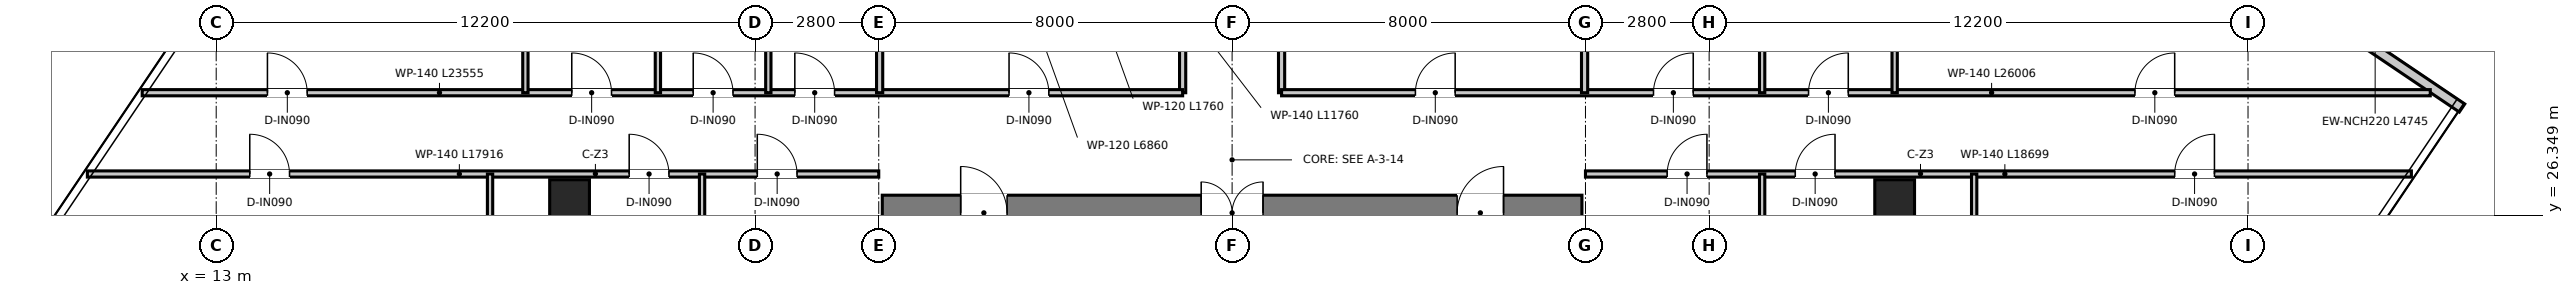
"""IFC4 building model, lengths in metres.
Left out: names, types, materials, properties, quantities, classifications, styles, units other than length and angle.
Written with IfcOpenShell. Run it as: python <this file> out.ifc"""

import sys

from ifc_helpers import new_model, si_unit, direction, frame, frame_2d, origin, origin_2d, place, context, subcontext, project, spatial, rectangle, extrude, source, transform, mapped, element, fill, save


model = new_model("IFC4")
c1 = context("Model", 3, precision=1e-05, world=origin(), true_north=direction((0.0, 1.0)))
c2 = subcontext(c1, "Body", "Model", "MODEL_VIEW")
j1 = project(units=[si_unit("LENGTHUNIT", "METRE"), si_unit("PLANEANGLEUNIT", "RADIAN")], contexts=[c1])
p1 = place(None, origin())
s1 = spatial("IfcSite", under=j1, at=p1, CompositionType="ELEMENT")
p2 = place(p1, origin())
s2 = spatial("IfcBuilding", under=s1, at=p2, CompositionType="ELEMENT")
p3 = place(p2, frame((0.0, 0.0, 185.7)))
s3 = spatial("IfcBuildingStorey", under=s2, at=p3, CompositionType="ELEMENT", Elevation=185.7)
p4 = place(p3, frame((28.08, 26.4, 0.0), z_axis=(0.0, 0.0, 1.0), x_axis=(1.0, 0.0, 0.0)))
e1 = element("IfcWall", 1, at=p4, inside=s3, PredefinedType="SHEAR", context=c2, shape_type="SweptSolid", body=[
    extrude(rectangle(XDim=15.84, YDim=0.8, at=frame_2d((7.92, 0.0))), origin(), (0.0, 0.0, 1.0), 3.95),
])
p5 = place(p4, frame((7.22, 0.0, 0.0)))
e2 = element("IfcOpeningElement", 2, at=p5, cuts=e1, PredefinedType="OPENING", context=c2, shape_type="SweptSolid", body=[
    extrude(rectangle(XDim=1.4, YDim=2.2, at=frame_2d((0.7, 1.1))), frame((0.0, 0.41, 0.0), z_axis=(0.0, -1.0, 0.0), x_axis=(1.0, 0.0, 0.0)), (0.0, 0.0, 1.0), 0.82),
])
p6 = place(p4, frame((1.775, 0.0, 0.0)))
e3 = element("IfcOpeningElement", 3, at=p6, cuts=e1, PredefinedType="OPENING", context=c2, shape_type="SweptSolid", body=[
    extrude(rectangle(XDim=1.05, YDim=2.1, at=frame_2d((0.525, 1.05))), frame((0.0, 0.41, 0.0), z_axis=(0.0, -1.0, 0.0), x_axis=(1.0, 0.0, 0.0)), (0.0, 0.0, 1.0), 0.82),
])
p7 = place(p4, frame((13.015, 0.0, 0.0)))
e4 = element("IfcOpeningElement", 4, at=p7, cuts=e1, PredefinedType="OPENING", context=c2, shape_type="SweptSolid", body=[
    extrude(rectangle(XDim=1.05, YDim=2.1, at=frame_2d((0.525, 1.05))), frame((0.0, 0.41, 0.0), z_axis=(0.0, -1.0, 0.0), x_axis=(1.0, 0.0, 0.0)), (0.0, 0.0, 1.0), 0.82),
])
m1 = source(origin(), c2, "Body", "SweptSolid", [
    extrude(rectangle(XDim=0.9, YDim=0.9, at=origin_2d()), origin(), (0.0, 0.0, 1.0), 3.95),
])
for number, where, z_axis, x_axis in (
    (5, (21.0, 26.7, 0.0), (0.0, 0.0, 1.0), (1.0, 0.0, 0.0)),
    (6, (51.0, 26.7, 0.0), (0.0, 0.0, 1.0), (1.0, 0.0, 0.0)),
):
    element("IfcColumn", number, at=place(p3, frame(where, z_axis=z_axis, x_axis=x_axis)), inside=s3, PredefinedType="COLUMN", context=c2, shape_type="MappedRepresentation", body=[
        mapped(m1, transform((0.0, 0.0, 0.0), x_axis=(1.0, 0.0, 0.0), y_axis=(0.0, 1.0, 0.0), z_axis=(0.0, 0.0, 1.0), scale=1.0)),
    ])
p8 = place(p3, frame((63.845, 28.774, 0.0), z_axis=(0.0, 0.0, 1.0), x_axis=(-0.829006114382, 0.559239539301, 0.0)))
e7 = element("IfcWall", 7, at=p8, inside=s3, PredefinedType="ELEMENTEDWALL", context=c2, shape_type="SweptSolid", body=[
    extrude(rectangle(XDim=4.745, YDim=0.22, at=frame_2d((2.373, 0.0))), origin(), (0.0, 0.0, 1.0), 3.67),
])
p9 = place(p3, frame((34.88, 29.12, 0.0), z_axis=(0.0, 0.0, 1.0), x_axis=(0.0, 1.0, 0.0)))
e8 = element("IfcWall", 8, at=p9, inside=s3, PredefinedType="PARTITIONING", context=c2, shape_type="SweptSolid", body=[
    extrude(rectangle(XDim=11.76, YDim=0.14, at=frame_2d((5.88, 0.0))), origin(), (0.0, 0.0, 1.0), 3.03),
])
p10 = place(p9, frame((4.085, 0.0, 0.0)))
e9 = element("IfcOpeningElement", 9, at=p10, cuts=e8, PredefinedType="OPENING", context=c2, shape_type="SweptSolid", body=[
    extrude(rectangle(XDim=0.95, YDim=2.1, at=frame_2d((0.475, 1.05))), frame((0.0, 0.08, 0.0), z_axis=(0.0, -1.0, 0.0), x_axis=(1.0, 0.0, 0.0)), (0.0, 0.0, 1.0), 0.16),
])
p11 = place(p9, frame((6.82, 0.0, 0.0)))
e10 = element("IfcOpeningElement", 10, at=p11, cuts=e8, PredefinedType="OPENING", context=c2, shape_type="SweptSolid", body=[
    extrude(rectangle(XDim=0.9, YDim=2.1, at=frame_2d((0.45, 1.05))), frame((0.0, 0.08, 0.0), z_axis=(0.0, -1.0, 0.0), x_axis=(1.0, 0.0, 0.0)), (0.0, 0.0, 1.0), 0.16),
])
p12 = place(p9, frame((9.83, 0.0, 0.0)))
e11 = element("IfcOpeningElement", 11, at=p12, cuts=e8, PredefinedType="OPENING", context=c2, shape_type="SweptSolid", body=[
    extrude(rectangle(XDim=0.9, YDim=2.1, at=frame_2d((0.45, 1.05))), frame((0.0, 0.08, 0.0), z_axis=(0.0, -1.0, 0.0), x_axis=(1.0, 0.0, 0.0)), (0.0, 0.0, 1.0), 0.16),
])
p13 = place(p3, frame((37.12, 29.12, 0.0), z_axis=(0.0, 0.0, 1.0), x_axis=(0.0, 1.0, 0.0)))
e12 = element("IfcWall", 12, at=p13, inside=s3, PredefinedType="PARTITIONING", context=c2, shape_type="SweptSolid", body=[
    extrude(rectangle(XDim=11.76, YDim=0.14, at=frame_2d((5.88, 0.0))), origin(), (0.0, 0.0, 1.0), 3.03),
])
p14 = place(p13, frame((3.205, 0.0, 0.0)))
e13 = element("IfcOpeningElement", 13, at=p14, cuts=e12, PredefinedType="OPENING", context=c2, shape_type="SweptSolid", body=[
    extrude(rectangle(XDim=0.95, YDim=2.1, at=frame_2d((0.475, 1.05))), frame((0.0, 0.08, 0.0), z_axis=(0.0, -1.0, 0.0), x_axis=(1.0, 0.0, 0.0)), (0.0, 0.0, 1.0), 0.16),
])
p15 = place(p13, frame((8.02, 0.0, 0.0)))
e14 = element("IfcOpeningElement", 14, at=p15, cuts=e12, PredefinedType="OPENING", context=c2, shape_type="SweptSolid", body=[
    extrude(rectangle(XDim=0.9, YDim=2.1, at=frame_2d((0.45, 1.05))), frame((0.0, 0.08, 0.0), z_axis=(0.0, -1.0, 0.0), x_axis=(1.0, 0.0, 0.0)), (0.0, 0.0, 1.0), 0.16),
])
p16 = place(p3, frame((11.325, 29.12, 0.0), z_axis=(0.0, 0.0, 1.0), x_axis=(1.0, 0.0, 0.0)))
e15 = element("IfcWall", 15, at=p16, inside=s3, PredefinedType="PARTITIONING", context=c2, shape_type="SweptSolid", body=[
    extrude(rectangle(XDim=23.555, YDim=0.14, at=frame_2d((11.778, 0.0))), origin(), (0.0, 0.0, 1.0), 3.03),
])
p17 = place(p16, frame((19.625, 0.0, 0.0)))
e16 = element("IfcOpeningElement", 16, at=p17, cuts=e15, PredefinedType="OPENING", context=c2, shape_type="SweptSolid", body=[
    extrude(rectangle(XDim=0.9, YDim=2.1, at=frame_2d((0.45, 1.05))), frame((0.0, 0.08, 0.0), z_axis=(0.0, -1.0, 0.0), x_axis=(1.0, 0.0, 0.0)), (0.0, 0.0, 1.0), 0.16),
])
p18 = place(p16, frame((2.835, 0.0, 0.0)))
e17 = element("IfcOpeningElement", 17, at=p18, cuts=e15, PredefinedType="OPENING", context=c2, shape_type="SweptSolid", body=[
    extrude(rectangle(XDim=0.9, YDim=2.1, at=frame_2d((0.45, 1.05))), frame((0.0, 0.08, 0.0), z_axis=(0.0, -1.0, 0.0), x_axis=(1.0, 0.0, 0.0)), (0.0, 0.0, 1.0), 0.16),
])
p19 = place(p16, frame((9.725, 0.0, 0.0)))
e18 = element("IfcOpeningElement", 18, at=p19, cuts=e15, PredefinedType="OPENING", context=c2, shape_type="SweptSolid", body=[
    extrude(rectangle(XDim=0.9, YDim=2.1, at=frame_2d((0.45, 1.05))), frame((0.0, 0.08, 0.0), z_axis=(0.0, -1.0, 0.0), x_axis=(1.0, 0.0, 0.0)), (0.0, 0.0, 1.0), 0.16),
])
p20 = place(p16, frame((12.475, 0.0, 0.0)))
e19 = element("IfcOpeningElement", 19, at=p20, cuts=e15, PredefinedType="OPENING", context=c2, shape_type="SweptSolid", body=[
    extrude(rectangle(XDim=0.9, YDim=2.1, at=frame_2d((0.45, 1.05))), frame((0.0, 0.08, 0.0), z_axis=(0.0, -1.0, 0.0), x_axis=(1.0, 0.0, 0.0)), (0.0, 0.0, 1.0), 0.16),
])
p21 = place(p16, frame((14.775, 0.0, 0.0)))
e20 = element("IfcOpeningElement", 20, at=p21, cuts=e15, PredefinedType="OPENING", context=c2, shape_type="SweptSolid", body=[
    extrude(rectangle(XDim=0.9, YDim=2.1, at=frame_2d((0.45, 1.05))), frame((0.0, 0.08, 0.0), z_axis=(0.0, -1.0, 0.0), x_axis=(1.0, 0.0, 0.0)), (0.0, 0.0, 1.0), 0.16),
])
p22 = place(p3, frame((37.12, 29.12, 0.0), z_axis=(0.0, 0.0, 1.0), x_axis=(1.0, 0.0, 0.0)))
e21 = element("IfcWall", 21, at=p22, inside=s3, PredefinedType="PARTITIONING", context=c2, shape_type="SweptSolid", body=[
    extrude(rectangle(XDim=26.006, YDim=0.14, at=frame_2d((13.003, 0.0))), origin(), (0.0, 0.0, 1.0), 3.03),
])
p23 = place(p22, frame((3.03, 0.0, 0.0)))
e22 = element("IfcOpeningElement", 22, at=p23, cuts=e21, PredefinedType="OPENING", context=c2, shape_type="SweptSolid", body=[
    extrude(rectangle(XDim=0.9, YDim=2.1, at=frame_2d((0.45, 1.05))), frame((0.0, 0.08, 0.0), z_axis=(0.0, -1.0, 0.0), x_axis=(1.0, 0.0, 0.0)), (0.0, 0.0, 1.0), 0.16),
])
p24 = place(p22, frame((8.42, 0.0, 0.0)))
e23 = element("IfcOpeningElement", 23, at=p24, cuts=e21, PredefinedType="OPENING", context=c2, shape_type="SweptSolid", body=[
    extrude(rectangle(XDim=0.9, YDim=2.1, at=frame_2d((0.45, 1.05))), frame((0.0, 0.08, 0.0), z_axis=(0.0, -1.0, 0.0), x_axis=(1.0, 0.0, 0.0)), (0.0, 0.0, 1.0), 0.16),
])
p25 = place(p22, frame((11.93, 0.0, 0.0)))
e24 = element("IfcOpeningElement", 24, at=p25, cuts=e21, PredefinedType="OPENING", context=c2, shape_type="SweptSolid", body=[
    extrude(rectangle(XDim=0.9, YDim=2.1, at=frame_2d((0.45, 1.05))), frame((0.0, 0.08, 0.0), z_axis=(0.0, -1.0, 0.0), x_axis=(1.0, 0.0, 0.0)), (0.0, 0.0, 1.0), 0.16),
])
p26 = place(p22, frame((19.32, 0.0, 0.0)))
e25 = element("IfcOpeningElement", 25, at=p26, cuts=e21, PredefinedType="OPENING", context=c2, shape_type="SweptSolid", body=[
    extrude(rectangle(XDim=0.9, YDim=2.1, at=frame_2d((0.45, 1.05))), frame((0.0, 0.08, 0.0), z_axis=(0.0, -1.0, 0.0), x_axis=(1.0, 0.0, 0.0)), (0.0, 0.0, 1.0), 0.16),
])
p27 = place(p3, frame((10.083, 27.28, 0.0), z_axis=(0.0, 0.0, 1.0), x_axis=(1.0, 0.0, 0.0)))
e26 = element("IfcWall", 26, at=p27, inside=s3, PredefinedType="PARTITIONING", context=c2, shape_type="SweptSolid", body=[
    extrude(rectangle(XDim=17.917, YDim=0.14, at=frame_2d((8.958, 0.0))), origin(), (0.0, 0.0, 1.0), 3.03),
])
p28 = place(p27, frame((3.677, 0.0, 0.0)))
e27 = element("IfcOpeningElement", 27, at=p28, cuts=e26, PredefinedType="OPENING", context=c2, shape_type="SweptSolid", body=[
    extrude(rectangle(XDim=0.9, YDim=2.1, at=frame_2d((0.45, 1.05))), frame((0.0, 0.08, 0.0), z_axis=(0.0, -1.0, 0.0), x_axis=(1.0, 0.0, 0.0)), (0.0, 0.0, 1.0), 0.16),
])
p29 = place(p27, frame((12.266, 0.0, 0.0)))
e28 = element("IfcOpeningElement", 28, at=p29, cuts=e26, PredefinedType="OPENING", context=c2, shape_type="SweptSolid", body=[
    extrude(rectangle(XDim=0.9, YDim=2.1, at=frame_2d((0.45, 1.05))), frame((0.0, 0.08, 0.0), z_axis=(0.0, -1.0, 0.0), x_axis=(1.0, 0.0, 0.0)), (0.0, 0.0, 1.0), 0.16),
])
p30 = place(p27, frame((15.167, 0.0, 0.0)))
e29 = element("IfcOpeningElement", 29, at=p30, cuts=e26, PredefinedType="OPENING", context=c2, shape_type="SweptSolid", body=[
    extrude(rectangle(XDim=0.9, YDim=2.1, at=frame_2d((0.45, 1.05))), frame((0.0, 0.08, 0.0), z_axis=(0.0, -1.0, 0.0), x_axis=(1.0, 0.0, 0.0)), (0.0, 0.0, 1.0), 0.16),
])
p31 = place(p3, frame((44.0, 27.28, 0.0), z_axis=(0.0, 0.0, 1.0), x_axis=(1.0, 0.0, 0.0)))
e30 = element("IfcWall", 30, at=p31, inside=s3, PredefinedType="PARTITIONING", context=c2, shape_type="SweptSolid", body=[
    extrude(rectangle(XDim=18.699, YDim=0.14, at=frame_2d((9.349, 0.0))), origin(), (0.0, 0.0, 1.0), 3.03),
])
p32 = place(p31, frame((1.85, 0.0, 0.0)))
e31 = element("IfcOpeningElement", 31, at=p32, cuts=e30, PredefinedType="OPENING", context=c2, shape_type="SweptSolid", body=[
    extrude(rectangle(XDim=0.9, YDim=2.1, at=frame_2d((0.45, 1.05))), frame((0.0, 0.08, 0.0), z_axis=(0.0, -1.0, 0.0), x_axis=(1.0, 0.0, 0.0)), (0.0, 0.0, 1.0), 0.16),
])
p33 = place(p31, frame((4.75, 0.0, 0.0)))
e32 = element("IfcOpeningElement", 32, at=p33, cuts=e30, PredefinedType="OPENING", context=c2, shape_type="SweptSolid", body=[
    extrude(rectangle(XDim=0.9, YDim=2.1, at=frame_2d((0.45, 1.05))), frame((0.0, 0.08, 0.0), z_axis=(0.0, -1.0, 0.0), x_axis=(1.0, 0.0, 0.0)), (0.0, 0.0, 1.0), 0.16),
])
p34 = place(p31, frame((13.34, 0.0, 0.0)))
e33 = element("IfcOpeningElement", 33, at=p34, cuts=e30, PredefinedType="OPENING", context=c2, shape_type="SweptSolid", body=[
    extrude(rectangle(XDim=0.9, YDim=2.1, at=frame_2d((0.45, 1.05))), frame((0.0, 0.08, 0.0), z_axis=(0.0, -1.0, 0.0), x_axis=(1.0, 0.0, 0.0)), (0.0, 0.0, 1.0), 0.16),
])
for number, where, z_axis, x_axis in (
    (34, (28.02, 29.12, 0.0), (0.0, 0.0, 1.0), (0.0, 1.0, 0.0)),
    (35, (43.98, 29.12, 0.0), (0.0, 0.0, 1.0), (0.0, 1.0, 0.0)),
):
    element("IfcWall", number, at=place(p3, frame(where, z_axis=z_axis, x_axis=x_axis)), inside=s3, PredefinedType="PARTITIONING", context=c2, shape_type="SweptSolid", body=[
        extrude(rectangle(XDim=5.46, YDim=0.14, at=frame_2d((2.73, 0.0))), origin(), (0.0, 0.0, 1.0), 3.31),
    ])
p35 = place(p3, frame((20.0, 29.12, 0.0), z_axis=(0.0, 0.0, 1.0), x_axis=(0.0, 1.0, 0.0)))
e36 = element("IfcWall", 36, at=p35, inside=s3, PredefinedType="PARTITIONING", context=c2, shape_type="SweptSolid", body=[
    extrude(rectangle(XDim=12.862, YDim=0.12, at=frame_2d((6.431, 0.0))), origin(), (0.0, 0.0, 1.0), 3.67),
])
p36 = place(p3, frame((23.0, 29.12, 0.0), z_axis=(0.0, 0.0, 1.0), x_axis=(0.0, 1.0, 0.0)))
e37 = element("IfcWall", 37, at=p36, inside=s3, PredefinedType="PARTITIONING", context=c2, shape_type="SweptSolid", body=[
    extrude(rectangle(XDim=17.309, YDim=0.12, at=frame_2d((8.655, 0.0))), origin(), (0.0, 0.0, 1.0), 3.08),
])
p37 = place(p3, frame((25.5, 29.12, 0.0), z_axis=(0.0, 0.0, 1.0), x_axis=(0.0, 1.0, 0.0)))
e38 = element("IfcWall", 38, at=p37, inside=s3, PredefinedType="PARTITIONING", context=c2, shape_type="SweptSolid", body=[
    extrude(rectangle(XDim=21.016, YDim=0.12, at=frame_2d((10.508, 0.0))), origin(), (0.0, 0.0, 1.0), 3.03),
])
p38 = place(p3, frame((48.0, 29.12, 0.0), z_axis=(0.0, 0.0, 1.0), x_axis=(0.0, 1.0, 0.0)))
e39 = element("IfcWall", 39, at=p38, inside=s3, PredefinedType="PARTITIONING", context=c2, shape_type="SweptSolid", body=[
    extrude(rectangle(XDim=13.218, YDim=0.12, at=frame_2d((6.609, 0.0))), origin(), (0.0, 0.0, 1.0), 3.08),
])
p39 = place(p3, frame((51.0, 29.12, 0.0), z_axis=(0.0, 0.0, 1.0), x_axis=(0.0, 1.0, 0.0)))
e40 = element("IfcWall", 40, at=p39, inside=s3, PredefinedType="PARTITIONING", context=c2, shape_type="SweptSolid", body=[
    extrude(rectangle(XDim=12.862, YDim=0.12, at=frame_2d((6.431, 0.0))), origin(), (0.0, 0.0, 1.0), 3.08),
])
p40 = place(p3, frame((19.2, 11.724, 0.0), z_axis=(0.0, 0.0, 1.0), x_axis=(0.0, 1.0, 0.0)))
e41 = element("IfcWall", 41, at=p40, inside=s3, PredefinedType="PARTITIONING", context=c2, shape_type="SweptSolid", body=[
    extrude(rectangle(XDim=15.556, YDim=0.12, at=frame_2d((7.778, 0.0))), origin(), (0.0, 0.0, 1.0), 3.67),
])
p41 = place(p3, frame((24.0, 8.487, 0.0), z_axis=(0.0, 0.0, 1.0), x_axis=(0.0, 1.0, 0.0)))
e42 = element("IfcWall", 42, at=p41, inside=s3, PredefinedType="PARTITIONING", context=c2, shape_type="SweptSolid", body=[
    extrude(rectangle(XDim=18.793, YDim=0.12, at=frame_2d((9.397, 0.0))), origin(), (0.0, 0.0, 1.0), 3.08),
])
p42 = place(p3, frame((48.0, 5.488, 0.0), z_axis=(0.0, 0.0, 1.0), x_axis=(0.0, 1.0, 0.0)))
e43 = element("IfcWall", 43, at=p42, inside=s3, PredefinedType="PARTITIONING", context=c2, shape_type="SweptSolid", body=[
    extrude(rectangle(XDim=21.792, YDim=0.12, at=frame_2d((10.896, 0.0))), origin(), (0.0, 0.0, 1.0), 3.08),
])
p43 = place(p3, frame((52.8, 12.604, 0.0), z_axis=(0.0, 0.0, 1.0), x_axis=(0.0, 1.0, 0.0)))
e44 = element("IfcWall", 44, at=p43, inside=s3, PredefinedType="PARTITIONING", context=c2, shape_type="SweptSolid", body=[
    extrude(rectangle(XDim=14.676, YDim=0.12, at=frame_2d((7.338, 0.0))), origin(), (0.0, 0.0, 1.0), 3.67),
])
p44 = place(p5, origin())
e45 = element("IfcDoor", 45, at=p44, inside=s3, OperationType="DOUBLE_DOOR_SINGLE_SWING", PredefinedType="DOOR", context=c2, shape_type="SweptSolid", body=[
    extrude(rectangle(XDim=1.4, YDim=2.2, at=frame_2d((0.7, 1.1))), frame((0.0, 0.025, 0.0), z_axis=(0.0, -1.0, 0.0), x_axis=(1.0, 0.0, 0.0)), (0.0, 0.0, 1.0), 0.05),
])
fill(e2, e45)
p45 = place(p6, origin())
e46 = element("IfcDoor", 46, at=p45, inside=s3, OperationType="SINGLE_SWING_LEFT", PredefinedType="DOOR", context=c2, shape_type="SweptSolid", body=[
    extrude(rectangle(XDim=1.05, YDim=2.1, at=frame_2d((0.525, 1.05))), frame((0.0, 0.025, 0.0), z_axis=(0.0, -1.0, 0.0), x_axis=(1.0, 0.0, 0.0)), (0.0, 0.0, 1.0), 0.05),
])
fill(e3, e46)
p46 = place(p7, origin())
e47 = element("IfcDoor", 47, at=p46, inside=s3, OperationType="SINGLE_SWING_RIGHT", PredefinedType="DOOR", context=c2, shape_type="SweptSolid", body=[
    extrude(rectangle(XDim=1.05, YDim=2.1, at=frame_2d((0.525, 1.05))), frame((0.0, 0.025, 0.0), z_axis=(0.0, -1.0, 0.0), x_axis=(1.0, 0.0, 0.0)), (0.0, 0.0, 1.0), 0.05),
])
fill(e4, e47)
p47 = place(p17, origin())
e48 = element("IfcDoor", 48, at=p47, inside=s3, OperationType="SINGLE_SWING_LEFT", PredefinedType="DOOR", context=c2, shape_type="SweptSolid", body=[
    extrude(rectangle(XDim=0.9, YDim=2.1, at=frame_2d((0.45, 1.05))), frame((0.0, 0.025, 0.0), z_axis=(0.0, -1.0, 0.0), x_axis=(1.0, 0.0, 0.0)), (0.0, 0.0, 1.0), 0.05),
])
fill(e16, e48)
p48 = place(p23, origin())
e49 = element("IfcDoor", 49, at=p48, inside=s3, OperationType="SINGLE_SWING_RIGHT", PredefinedType="DOOR", context=c2, shape_type="SweptSolid", body=[
    extrude(rectangle(XDim=0.9, YDim=2.1, at=frame_2d((0.45, 1.05))), frame((0.0, 0.025, 0.0), z_axis=(0.0, -1.0, 0.0), x_axis=(1.0, 0.0, 0.0)), (0.0, 0.0, 1.0), 0.05),
])
fill(e22, e49)
p49 = place(p18, origin())
e50 = element("IfcDoor", 50, at=p49, inside=s3, OperationType="SINGLE_SWING_LEFT", PredefinedType="DOOR", context=c2, shape_type="SweptSolid", body=[
    extrude(rectangle(XDim=0.9, YDim=2.1, at=frame_2d((0.45, 1.05))), frame((0.0, 0.025, 0.0), z_axis=(0.0, -1.0, 0.0), x_axis=(1.0, 0.0, 0.0)), (0.0, 0.0, 1.0), 0.05),
])
fill(e17, e50)
p50 = place(p19, origin())
e51 = element("IfcDoor", 51, at=p50, inside=s3, OperationType="SINGLE_SWING_LEFT", PredefinedType="DOOR", context=c2, shape_type="SweptSolid", body=[
    extrude(rectangle(XDim=0.9, YDim=2.1, at=frame_2d((0.45, 1.05))), frame((0.0, 0.025, 0.0), z_axis=(0.0, -1.0, 0.0), x_axis=(1.0, 0.0, 0.0)), (0.0, 0.0, 1.0), 0.05),
])
fill(e18, e51)
p51 = place(p20, origin())
e52 = element("IfcDoor", 52, at=p51, inside=s3, OperationType="SINGLE_SWING_LEFT", PredefinedType="DOOR", context=c2, shape_type="SweptSolid", body=[
    extrude(rectangle(XDim=0.9, YDim=2.1, at=frame_2d((0.45, 1.05))), frame((0.0, 0.025, 0.0), z_axis=(0.0, -1.0, 0.0), x_axis=(1.0, 0.0, 0.0)), (0.0, 0.0, 1.0), 0.05),
])
fill(e19, e52)
p52 = place(p21, origin())
e53 = element("IfcDoor", 53, at=p52, inside=s3, OperationType="SINGLE_SWING_LEFT", PredefinedType="DOOR", context=c2, shape_type="SweptSolid", body=[
    extrude(rectangle(XDim=0.9, YDim=2.1, at=frame_2d((0.45, 1.05))), frame((0.0, 0.025, 0.0), z_axis=(0.0, -1.0, 0.0), x_axis=(1.0, 0.0, 0.0)), (0.0, 0.0, 1.0), 0.05),
])
fill(e20, e53)
p53 = place(p24, origin())
e54 = element("IfcDoor", 54, at=p53, inside=s3, OperationType="SINGLE_SWING_RIGHT", PredefinedType="DOOR", context=c2, shape_type="SweptSolid", body=[
    extrude(rectangle(XDim=0.9, YDim=2.1, at=frame_2d((0.45, 1.05))), frame((0.0, 0.025, 0.0), z_axis=(0.0, -1.0, 0.0), x_axis=(1.0, 0.0, 0.0)), (0.0, 0.0, 1.0), 0.05),
])
fill(e23, e54)
p54 = place(p25, origin())
e55 = element("IfcDoor", 55, at=p54, inside=s3, OperationType="SINGLE_SWING_RIGHT", PredefinedType="DOOR", context=c2, shape_type="SweptSolid", body=[
    extrude(rectangle(XDim=0.9, YDim=2.1, at=frame_2d((0.45, 1.05))), frame((0.0, 0.025, 0.0), z_axis=(0.0, -1.0, 0.0), x_axis=(1.0, 0.0, 0.0)), (0.0, 0.0, 1.0), 0.05),
])
fill(e24, e55)
p55 = place(p26, origin())
e56 = element("IfcDoor", 56, at=p55, inside=s3, OperationType="SINGLE_SWING_RIGHT", PredefinedType="DOOR", context=c2, shape_type="SweptSolid", body=[
    extrude(rectangle(XDim=0.9, YDim=2.1, at=frame_2d((0.45, 1.05))), frame((0.0, 0.025, 0.0), z_axis=(0.0, -1.0, 0.0), x_axis=(1.0, 0.0, 0.0)), (0.0, 0.0, 1.0), 0.05),
])
fill(e25, e56)
p56 = place(p28, origin())
e57 = element("IfcDoor", 57, at=p56, inside=s3, OperationType="SINGLE_SWING_LEFT", PredefinedType="DOOR", context=c2, shape_type="SweptSolid", body=[
    extrude(rectangle(XDim=0.9, YDim=2.1, at=frame_2d((0.45, 1.05))), frame((0.0, 0.025, 0.0), z_axis=(0.0, -1.0, 0.0), x_axis=(1.0, 0.0, 0.0)), (0.0, 0.0, 1.0), 0.05),
])
fill(e27, e57)
p57 = place(p29, origin())
e58 = element("IfcDoor", 58, at=p57, inside=s3, OperationType="SINGLE_SWING_LEFT", PredefinedType="DOOR", context=c2, shape_type="SweptSolid", body=[
    extrude(rectangle(XDim=0.9, YDim=2.1, at=frame_2d((0.45, 1.05))), frame((0.0, 0.025, 0.0), z_axis=(0.0, -1.0, 0.0), x_axis=(1.0, 0.0, 0.0)), (0.0, 0.0, 1.0), 0.05),
])
fill(e28, e58)
p58 = place(p30, origin())
e59 = element("IfcDoor", 59, at=p58, inside=s3, OperationType="SINGLE_SWING_LEFT", PredefinedType="DOOR", context=c2, shape_type="SweptSolid", body=[
    extrude(rectangle(XDim=0.9, YDim=2.1, at=frame_2d((0.45, 1.05))), frame((0.0, 0.025, 0.0), z_axis=(0.0, -1.0, 0.0), x_axis=(1.0, 0.0, 0.0)), (0.0, 0.0, 1.0), 0.05),
])
fill(e29, e59)
p59 = place(p32, origin())
e60 = element("IfcDoor", 60, at=p59, inside=s3, OperationType="SINGLE_SWING_RIGHT", PredefinedType="DOOR", context=c2, shape_type="SweptSolid", body=[
    extrude(rectangle(XDim=0.9, YDim=2.1, at=frame_2d((0.45, 1.05))), frame((0.0, 0.025, 0.0), z_axis=(0.0, -1.0, 0.0), x_axis=(1.0, 0.0, 0.0)), (0.0, 0.0, 1.0), 0.05),
])
fill(e31, e60)
p60 = place(p33, origin())
e61 = element("IfcDoor", 61, at=p60, inside=s3, OperationType="SINGLE_SWING_RIGHT", PredefinedType="DOOR", context=c2, shape_type="SweptSolid", body=[
    extrude(rectangle(XDim=0.9, YDim=2.1, at=frame_2d((0.45, 1.05))), frame((0.0, 0.025, 0.0), z_axis=(0.0, -1.0, 0.0), x_axis=(1.0, 0.0, 0.0)), (0.0, 0.0, 1.0), 0.05),
])
fill(e32, e61)
p61 = place(p34, origin())
e62 = element("IfcDoor", 62, at=p61, inside=s3, OperationType="SINGLE_SWING_RIGHT", PredefinedType="DOOR", context=c2, shape_type="SweptSolid", body=[
    extrude(rectangle(XDim=0.9, YDim=2.1, at=frame_2d((0.45, 1.05))), frame((0.0, 0.025, 0.0), z_axis=(0.0, -1.0, 0.0), x_axis=(1.0, 0.0, 0.0)), (0.0, 0.0, 1.0), 0.05),
])
fill(e33, e62)
save(model, sys.argv[1])
